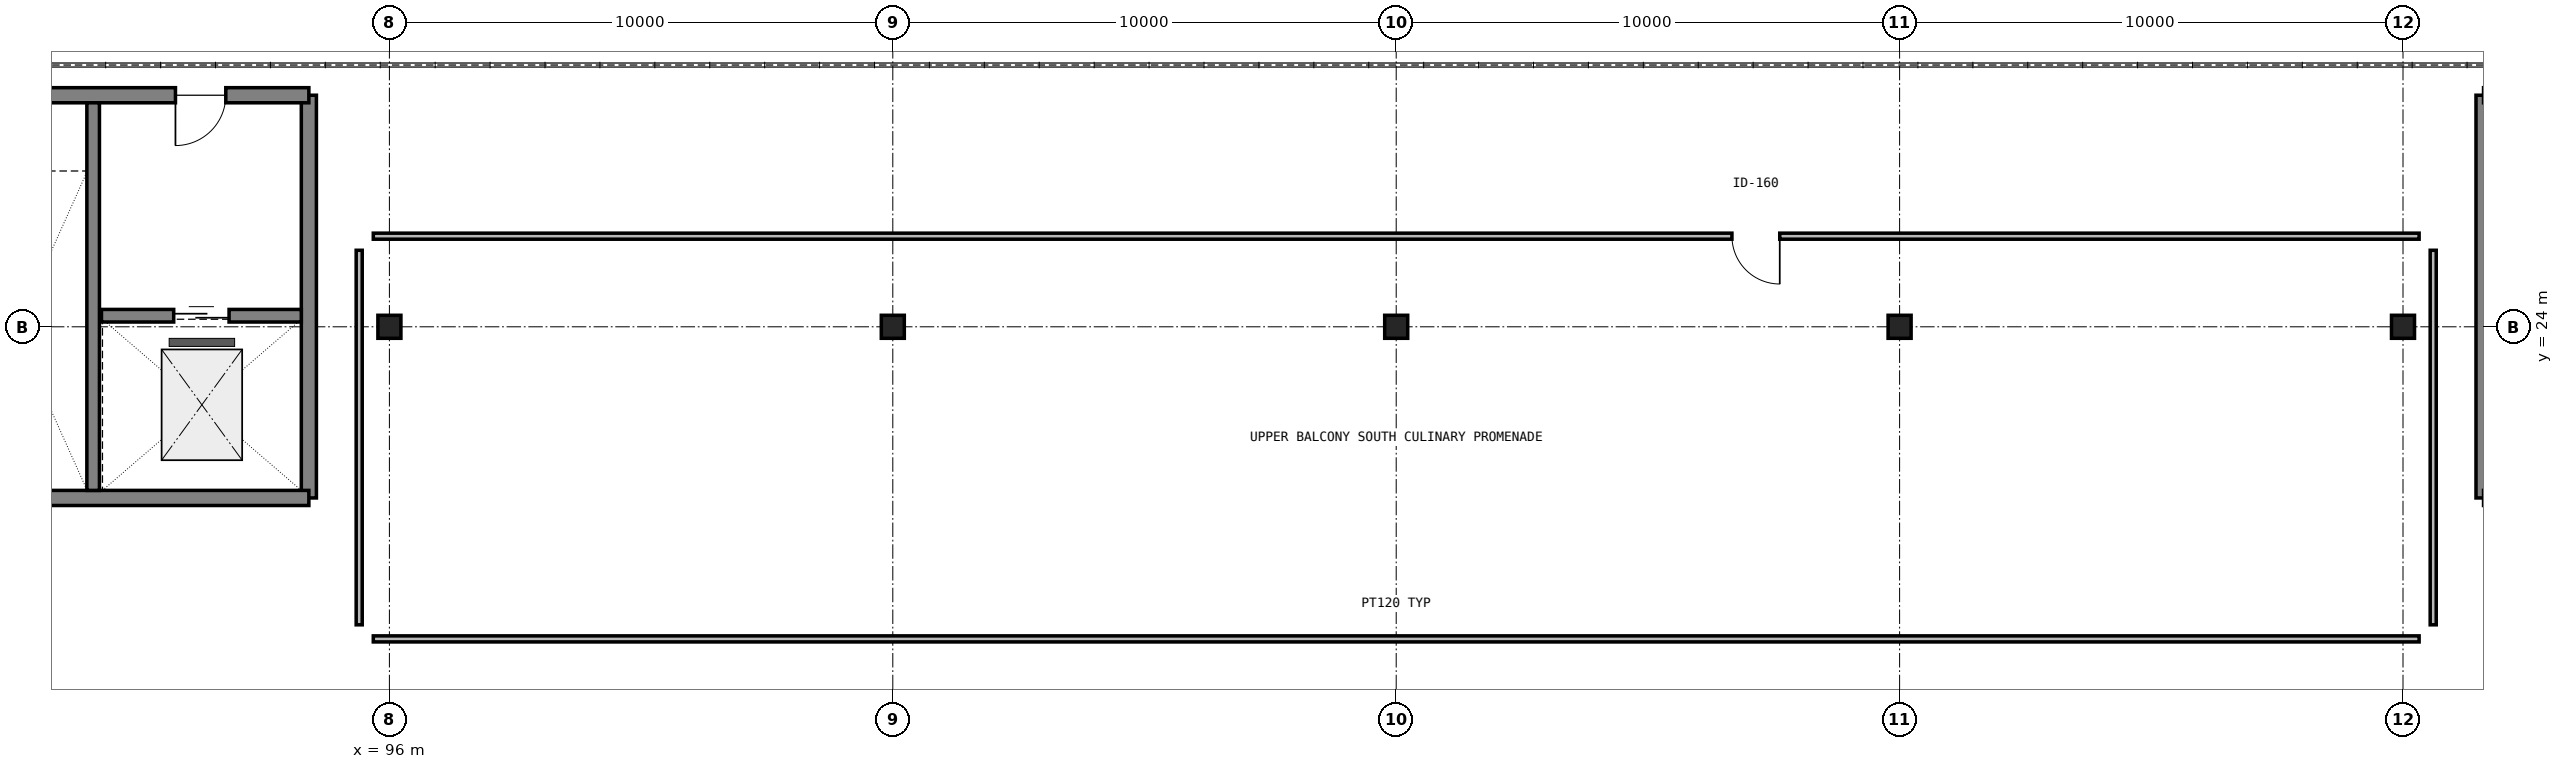
"""IFC4 building model, lengths in metres.
Left out: names, types, materials, properties, quantities, classifications, styles, units other than length and angle.
Written with IfcOpenShell. Run it as: python <this file> out.ifc"""

import sys

from ifc_helpers import new_model, si_unit, direction, frame, frame_2d, origin, origin_2d_with_axis, place, context, subcontext, project, spatial, rectangle, hollow_circle, extrude, element, fill, save


model = new_model("IFC4")
c1 = context("Model", 3, precision=1e-05, world=origin(), true_north=direction((0.0, 1.0)))
c2 = subcontext(c1, "Body", "Model", "MODEL_VIEW")
j1 = project(units=[si_unit("LENGTHUNIT", "METRE"), si_unit("PLANEANGLEUNIT", "RADIAN")], contexts=[c1])
p1 = place(None, origin())
s1 = spatial("IfcSite", under=j1, at=p1, CompositionType="ELEMENT")
p2 = place(p1, origin())
s2 = spatial("IfcBuilding", under=s1, at=p2, CompositionType="ELEMENT")
p3 = place(p2, frame((0.0, 0.0, 8.4)))
s3 = spatial("IfcBuildingStorey", under=s2, at=p3, CompositionType="ELEMENT", Elevation=8.4)
for number, where, z_axis, x_axis in (
    (1, (96.0, 24.0, 0.0), (0.0, 0.0, 1.0), (1.0, 0.0, 0.0)),
    (2, (106.0, 24.0, 0.0), (0.0, 0.0, 1.0), (1.0, 0.0, 0.0)),
    (3, (116.0, 24.0, 0.0), (0.0, 0.0, 1.0), (1.0, 0.0, 0.0)),
    (4, (126.0, 24.0, 0.0), (0.0, 0.0, 1.0), (1.0, 0.0, 0.0)),
    (5, (136.0, 24.0, 0.0), (0.0, 0.0, 1.0), (1.0, 0.0, 0.0)),
):
    element("IfcColumn", number, at=place(p3, frame(where, z_axis=z_axis, x_axis=x_axis)), inside=s3, PredefinedType="COLUMN", context=c2, shape_type="SweptSolid", body=[
        extrude(hollow_circle(Radius=0.229, WallThickness=0.013, at=origin_2d_with_axis()), origin(), (0.0, 0.0, 1.0), 6.0),
    ])
p4 = place(p3, frame((94.4, 20.6, 0.0), z_axis=(0.0, 0.0, 1.0), x_axis=(0.0, 1.0, 0.0)))
e6 = element("IfcWall", 6, at=p4, inside=s3, PredefinedType="SHEAR", context=c2, shape_type="SweptSolid", body=[
    extrude(rectangle(XDim=8.0, YDim=0.3, at=frame_2d((4.0, 0.0), x_axis=(1.0, 0.0))), origin(), (0.0, 0.0, 1.0), 3.36),
])
p5 = place(p3, frame((87.0, 20.6, 0.0), z_axis=(0.0, 0.0, 1.0), x_axis=(1.0, 0.0, 0.0)))
e7 = element("IfcWall", 7, at=p5, inside=s3, PredefinedType="SHEAR", context=c2, shape_type="SweptSolid", body=[
    extrude(rectangle(XDim=7.4, YDim=0.3, at=frame_2d((3.7, 0.0), x_axis=(1.0, 0.0))), origin(), (0.0, 0.0, 1.0), 3.36),
])
p6 = place(p3, frame((94.4, 28.6, 0.0), z_axis=(0.0, 0.0, 1.0), x_axis=(-1.0, 0.0, 0.0)))
e8 = element("IfcWall", 8, at=p6, inside=s3, PredefinedType="SHEAR", context=c2, shape_type="SweptSolid", body=[
    extrude(rectangle(XDim=7.4, YDim=0.3, at=frame_2d((3.7, 0.0), x_axis=(1.0, 0.0))), origin(), (0.0, 0.0, 1.0), 3.36),
])
p7 = place(p6, frame((1.65, 0.0, 0.0)))
e9 = element("IfcOpeningElement", 9, at=p7, cuts=e8, PredefinedType="OPENING", context=c2, shape_type="SweptSolid", body=[
    extrude(rectangle(XDim=1.0, YDim=2.15, at=frame_2d((0.5, 1.075), x_axis=(1.0, 0.0))), frame((0.0, 0.16, 0.0), z_axis=(0.0, -1.0, 0.0), x_axis=(1.0, 0.0, 0.0)), (0.0, 0.0, 1.0), 0.32),
])
p8 = place(p6, frame((5.3, 0.0, 0.0)))
e10 = element("IfcOpeningElement", 10, at=p8, cuts=e8, PredefinedType="OPENING", context=c2, shape_type="SweptSolid", body=[
    extrude(rectangle(XDim=1.0, YDim=2.15, at=frame_2d((0.5, 1.075), x_axis=(1.0, 0.0))), frame((0.0, 0.16, 0.0), z_axis=(0.0, -1.0, 0.0), x_axis=(1.0, 0.0, 0.0)), (0.0, 0.0, 1.0), 0.32),
])
p9 = place(p3, frame((90.115, 20.75, 0.0), z_axis=(0.0, 0.0, 1.0), x_axis=(0.0, 1.0, 0.0)))
e11 = element("IfcWall", 11, at=p9, inside=s3, PredefinedType="SHEAR", context=c2, shape_type="SweptSolid", body=[
    extrude(rectangle(XDim=7.7, YDim=0.25, at=frame_2d((3.85, 0.0), x_axis=(1.0, 0.0))), origin(), (0.0, 0.0, 1.0), 3.36),
])
p10 = place(p3, frame((90.28, 24.22, 0.0), z_axis=(0.0, 0.0, 1.0), x_axis=(1.0, 0.0, 0.0)))
e12 = element("IfcWall", 12, at=p10, inside=s3, PredefinedType="SHEAR", context=c2, shape_type="SweptSolid", body=[
    extrude(rectangle(XDim=3.97, YDim=0.25, at=frame_2d((1.985, 0.0), x_axis=(1.0, 0.0))), origin(), (0.0, 0.0, 1.0), 3.36),
])
p11 = place(p10, frame((1.435, 0.0, 0.0)))
e13 = element("IfcOpeningElement", 13, at=p11, cuts=e12, PredefinedType="OPENING", context=c2, shape_type="SweptSolid", body=[
    extrude(rectangle(XDim=1.1, YDim=2.15, at=frame_2d((0.55, 1.075), x_axis=(1.0, 0.0))), frame((0.0, 0.135, 0.0), z_axis=(0.0, -1.0, 0.0), x_axis=(1.0, 0.0, 0.0)), (0.0, 0.0, 1.0), 0.27),
])
p12 = place(p3, frame((137.6, 28.6, 0.0), z_axis=(0.0, 0.0, 1.0), x_axis=(0.0, -1.0, 0.0)))
e14 = element("IfcWall", 14, at=p12, inside=s3, PredefinedType="SHEAR", context=c2, shape_type="SweptSolid", body=[
    extrude(rectangle(XDim=8.0, YDim=0.3, at=frame_2d((4.0, 0.0), x_axis=(1.0, 0.0))), origin(), (0.0, 0.0, 1.0), 3.36),
])
p13 = place(p3, frame((95.68, 17.8, 0.0), z_axis=(0.0, 0.0, 1.0), x_axis=(1.0, 0.0, 0.0)))
e15 = element("IfcWall", 15, at=p13, inside=s3, PredefinedType="PARTITIONING", context=c2, shape_type="SweptSolid", body=[
    extrude(rectangle(XDim=40.64, YDim=0.12, at=frame_2d((20.32, 0.0), x_axis=(1.0, 0.0))), origin(), (0.0, 0.0, 1.0), 2.74),
])
p14 = place(p3, frame((136.6, 18.08, 0.0), z_axis=(0.0, 0.0, 1.0), x_axis=(0.0, 1.0, 0.0)))
e16 = element("IfcWall", 16, at=p14, inside=s3, PredefinedType="PARTITIONING", context=c2, shape_type="SweptSolid", body=[
    extrude(rectangle(XDim=7.44, YDim=0.12, at=frame_2d((3.72, 0.0), x_axis=(1.0, 0.0))), origin(), (0.0, 0.0, 1.0), 2.74),
])
p15 = place(p3, frame((136.32, 25.8, 0.0), z_axis=(0.0, 0.0, 1.0), x_axis=(-1.0, 0.0, 0.0)))
e17 = element("IfcWall", 17, at=p15, inside=s3, PredefinedType="PARTITIONING", context=c2, shape_type="SweptSolid", body=[
    extrude(rectangle(XDim=40.64, YDim=0.12, at=frame_2d((20.32, 0.0), x_axis=(1.0, 0.0))), origin(), (0.0, 0.0, 1.0), 2.74),
])
p16 = place(p15, frame((12.701, 0.0, 0.0)))
e18 = element("IfcOpeningElement", 18, at=p16, cuts=e17, PredefinedType="OPENING", context=c2, shape_type="SweptSolid", body=[
    extrude(rectangle(XDim=0.95, YDim=2.15, at=frame_2d((0.475, 1.075), x_axis=(1.0, 0.0))), frame((0.0, 0.07, 0.0), z_axis=(0.0, -1.0, 0.0), x_axis=(1.0, 0.0, 0.0)), (0.0, 0.0, 1.0), 0.14),
])
p17 = place(p3, frame((95.4, 25.52, 0.0), z_axis=(0.0, 0.0, 1.0), x_axis=(0.0, -1.0, 0.0)))
e19 = element("IfcWall", 19, at=p17, inside=s3, PredefinedType="PARTITIONING", context=c2, shape_type="SweptSolid", body=[
    extrude(rectangle(XDim=7.44, YDim=0.12, at=frame_2d((3.72, 0.0), x_axis=(1.0, 0.0))), origin(), (0.0, 0.0, 1.0), 2.74),
])
p18 = place(p7, origin())
e20 = element("IfcDoor", 20, at=p18, inside=s3, OperationType="SINGLE_SWING_RIGHT", PredefinedType="DOOR", context=c2, shape_type="SweptSolid", body=[
    extrude(rectangle(XDim=1.0, YDim=2.15, at=frame_2d((0.5, 1.075), x_axis=(1.0, 0.0))), frame((0.0, 0.025, 0.0), z_axis=(0.0, -1.0, 0.0), x_axis=(1.0, 0.0, 0.0)), (0.0, 0.0, 1.0), 0.05),
])
fill(e9, e20)
p19 = place(p11, origin())
e21 = element("IfcDoor", 21, at=p19, inside=s3, OperationType="SLIDING_TO_LEFT", PredefinedType="DOOR", context=c2, shape_type="SweptSolid", body=[
    extrude(rectangle(XDim=1.1, YDim=2.15, at=frame_2d((0.55, 1.075), x_axis=(1.0, 0.0))), frame((0.0, 0.025, 0.0), z_axis=(0.0, -1.0, 0.0), x_axis=(1.0, 0.0, 0.0)), (0.0, 0.0, 1.0), 0.05),
])
fill(e13, e21)
p20 = place(p16, origin())
e22 = element("IfcDoor", 22, at=p20, inside=s3, OperationType="SINGLE_SWING_LEFT", PredefinedType="DOOR", context=c2, shape_type="SweptSolid", body=[
    extrude(rectangle(XDim=0.95, YDim=2.15, at=frame_2d((0.475, 1.075), x_axis=(1.0, 0.0))), frame((0.0, 0.025, 0.0), z_axis=(0.0, -1.0, 0.0), x_axis=(1.0, 0.0, 0.0)), (0.0, 0.0, 1.0), 0.05),
])
fill(e18, e22)
save(model, sys.argv[1])
